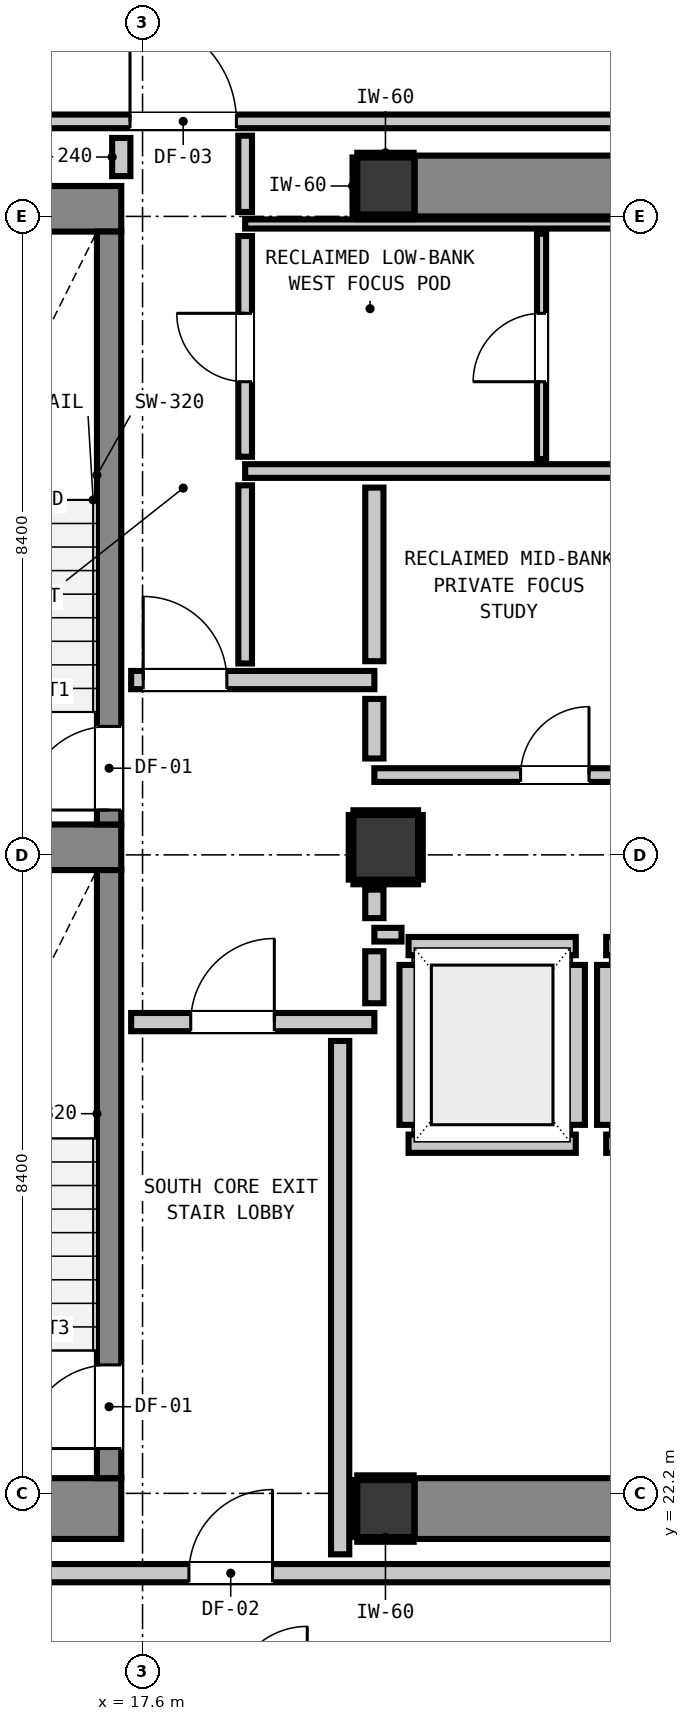
"""IFC4 building model, lengths in metres.
Left out: names, types, materials, properties, quantities, classifications, styles, units other than length and angle.
Written with IfcOpenShell. Run it as: python <this file> out.ifc"""

import sys

from ifc_helpers import new_model, si_unit, direction, frame, frame_2d, origin, origin_2d, place, context, subcontext, project, spatial, rectangle, extrude, element, fill, save


model = new_model("IFC4")
c1 = context("Model", 3, precision=1e-05, world=origin(), true_north=direction((0.0, 1.0)))
c2 = subcontext(c1, "Body", "Model", "MODEL_VIEW")
j1 = project(units=[si_unit("LENGTHUNIT", "METRE"), si_unit("PLANEANGLEUNIT", "RADIAN")], contexts=[c1])
p1 = place(None, origin())
s1 = spatial("IfcSite", under=j1, at=p1, CompositionType="ELEMENT")
p2 = place(p1, origin())
s2 = spatial("IfcBuilding", under=s1, at=p2, CompositionType="ELEMENT")
p3 = place(p2, frame((0.0, 0.0, 241.24)))
s3 = spatial("IfcBuildingStorey", under=s2, at=p3, CompositionType="ELEMENT", Elevation=241.24)
for number, where, z_axis, x_axis in (
    (1, (20.8, 22.0, 0.0), (0.0, 0.0, 1.0), (1.0, 0.0, 0.0)),
    (2, (20.8, 39.4, 0.0), (0.0, 0.0, 1.0), (1.0, 0.0, 0.0)),
):
    element("IfcColumn", number, at=place(p3, frame(where, z_axis=z_axis, x_axis=x_axis)), inside=s3, PredefinedType="COLUMN", context=c2, shape_type="SweptSolid", body=[
        extrude(rectangle(XDim=0.75, YDim=0.75, at=origin_2d()), origin(), (0.0, 0.0, 1.0), 3.32),
    ])
p4 = place(p3, frame((13.24, 22.0, 0.0), z_axis=(0.0, 0.0, 1.0), x_axis=(1.0, 0.0, 0.0)))
e3 = element("IfcWall", 3, at=p4, inside=s3, PredefinedType="SHEAR", context=c2, shape_type="SweptSolid", body=[
    extrude(rectangle(XDim=4.08, YDim=0.8, at=frame_2d((2.04, 0.0))), origin(), (0.0, 0.0, 1.0), 3.32),
])
p5 = place(p3, frame((13.24, 39.1, 0.0), z_axis=(0.0, 0.0, 1.0), x_axis=(1.0, 0.0, 0.0)))
e4 = element("IfcWall", 4, at=p5, inside=s3, PredefinedType="SHEAR", context=c2, shape_type="SweptSolid", body=[
    extrude(rectangle(XDim=4.08, YDim=0.6, at=frame_2d((2.04, 0.0))), origin(), (0.0, 0.0, 1.0), 3.32),
])
p6 = place(p3, frame((13.78, 30.7, 0.0), z_axis=(0.0, 0.0, 1.0), x_axis=(1.0, 0.0, 0.0)))
e5 = element("IfcWall", 5, at=p6, inside=s3, PredefinedType="SHEAR", context=c2, shape_type="SweptSolid", body=[
    extrude(rectangle(XDim=3.54, YDim=0.6, at=frame_2d((1.77, 0.0))), origin(), (0.0, 0.0, 1.0), 3.32),
])
for number, where, z_axis, x_axis in (
    (6, (21.18, 22.0, 0.0), (0.0, 0.0, 1.0), (1.0, 0.0, 0.0)),
    (7, (21.18, 39.4, 0.0), (0.0, 0.0, 1.0), (1.0, 0.0, 0.0)),
):
    element("IfcWall", number, at=place(p3, frame(where, z_axis=z_axis, x_axis=x_axis)), inside=s3, PredefinedType="SHEAR", context=c2, shape_type="SweptSolid", body=[
        extrude(rectangle(XDim=7.64, YDim=0.8, at=frame_2d((3.82, 0.0))), origin(), (0.0, 0.0, 1.0), 3.32),
    ])
p7 = place(p3, frame((17.16, 31.0, 0.0), z_axis=(0.0, 0.0, 1.0), x_axis=(0.0, 1.0, 0.0)))
e8 = element("IfcWall", 8, at=p7, inside=s3, PredefinedType="SHEAR", context=c2, shape_type="SweptSolid", body=[
    extrude(rectangle(XDim=7.8, YDim=0.32, at=frame_2d((3.9, 0.0))), origin(), (0.0, 0.0, 1.0), 3.32),
])
p8 = place(p7, frame((0.19, 0.0, 0.0)))
e9 = element("IfcOpeningElement", 9, at=p8, cuts=e8, PredefinedType="OPENING", context=c2, shape_type="SweptSolid", body=[
    extrude(rectangle(XDim=1.1, YDim=2.15, at=frame_2d((0.55, 1.075))), frame((0.0, 0.17, 0.0), z_axis=(0.0, -1.0, 0.0), x_axis=(1.0, 0.0, 0.0)), (0.0, 0.0, 1.0), 0.34),
])
p9 = place(p3, frame((17.16, 22.4, 0.0), z_axis=(0.0, 0.0, 1.0), x_axis=(0.0, 1.0, 0.0)))
e10 = element("IfcWall", 10, at=p9, inside=s3, PredefinedType="SHEAR", context=c2, shape_type="SweptSolid", body=[
    extrude(rectangle(XDim=8.0, YDim=0.32, at=frame_2d((4.0, 0.0))), origin(), (0.0, 0.0, 1.0), 3.32),
])
p10 = place(p9, frame((0.39, 0.0, 0.0)))
e11 = element("IfcOpeningElement", 11, at=p10, cuts=e10, PredefinedType="OPENING", context=c2, shape_type="SweptSolid", body=[
    extrude(rectangle(XDim=1.1, YDim=2.15, at=frame_2d((0.55, 1.075))), frame((0.0, 0.17, 0.0), z_axis=(0.0, -1.0, 0.0), x_axis=(1.0, 0.0, 0.0)), (0.0, 0.0, 1.0), 0.34),
])
p11 = place(p3, frame((20.8, 30.7, 0.0), z_axis=(0.0, 0.0, 1.0), x_axis=(1.0, 0.0, 0.0)))
e12 = element("IfcColumn", 12, at=p11, inside=s3, PredefinedType="COLUMN", context=c2, shape_type="SweptSolid", body=[
    extrude(rectangle(XDim=0.85, YDim=0.85, at=origin_2d()), origin(), (0.0, 0.0, 1.0), 3.32),
])
for number, where, z_axis, x_axis in (
    (13, (21.1, 26.8, 0.0), (0.0, 0.0, 1.0), (1.0, 0.0, 0.0)),
    (14, (21.1, 29.4, 0.0), (0.0, 0.0, 1.0), (1.0, 0.0, 0.0)),
):
    element("IfcWall", number, at=place(p3, frame(where, z_axis=z_axis, x_axis=x_axis)), inside=s3, PredefinedType="PARTITIONING", context=c2, shape_type="SweptSolid", body=[
        extrude(rectangle(XDim=2.2, YDim=0.24, at=frame_2d((1.1, 0.0))), origin(), (0.0, 0.0, 1.0), 3.1),
    ])
p12 = place(p3, frame((21.1, 27.048, 0.0), z_axis=(0.0, 0.0, 1.0), x_axis=(0.0, 1.0, 0.0)))
e15 = element("IfcWall", 15, at=p12, inside=s3, PredefinedType="PARTITIONING", context=c2, shape_type="SweptSolid", body=[
    extrude(rectangle(XDim=2.104, YDim=0.24, at=frame_2d((1.052, 0.0))), origin(), (0.0, 0.0, 1.0), 2.335),
])
p13 = place(p3, frame((23.3, 27.048, 0.0), z_axis=(0.0, 0.0, 1.0), x_axis=(0.0, 1.0, 0.0)))
e16 = element("IfcWall", 16, at=p13, inside=s3, PredefinedType="PARTITIONING", context=c2, shape_type="SweptSolid", body=[
    extrude(rectangle(XDim=2.104, YDim=0.24, at=frame_2d((1.052, 0.0))), origin(), (0.0, 0.0, 1.0), 3.1),
])
for number, where, z_axis, x_axis in (
    (17, (23.7, 26.8, 0.0), (0.0, 0.0, 1.0), (1.0, 0.0, 0.0)),
    (18, (23.7, 29.4, 0.0), (0.0, 0.0, 1.0), (1.0, 0.0, 0.0)),
):
    element("IfcWall", number, at=place(p3, frame(where, z_axis=z_axis, x_axis=x_axis)), inside=s3, PredefinedType="PARTITIONING", context=c2, shape_type="SweptSolid", body=[
        extrude(rectangle(XDim=2.2, YDim=0.24, at=frame_2d((1.1, 0.0))), origin(), (0.0, 0.0, 1.0), 3.1),
    ])
p14 = place(p3, frame((23.7, 27.048, 0.0), z_axis=(0.0, 0.0, 1.0), x_axis=(0.0, 1.0, 0.0)))
e19 = element("IfcWall", 19, at=p14, inside=s3, PredefinedType="PARTITIONING", context=c2, shape_type="SweptSolid", body=[
    extrude(rectangle(XDim=2.104, YDim=0.24, at=frame_2d((1.052, 0.0))), origin(), (0.0, 0.0, 1.0), 3.1),
])
p15 = place(p3, frame((10.787, 21.15, 0.0), z_axis=(0.0, 0.0, 1.0), x_axis=(1.0, 0.0, 0.0)))
e20 = element("IfcWall", 20, at=p15, inside=s3, PredefinedType="PARTITIONING", context=c2, shape_type="SweptSolid", body=[
    extrude(rectangle(XDim=26.102, YDim=0.24, at=frame_2d((13.051, 0.0))), origin(), (0.0, 0.0, 1.0), 3.1),
])
p16 = place(p15, frame((7.423, 0.0, 0.0)))
e21 = element("IfcOpeningElement", 21, at=p16, cuts=e20, PredefinedType="OPENING", context=c2, shape_type="SweptSolid", body=[
    extrude(rectangle(XDim=1.1, YDim=2.15, at=frame_2d((0.55, 1.075))), frame((0.0, 0.13, 0.0), z_axis=(0.0, -1.0, 0.0), x_axis=(1.0, 0.0, 0.0)), (0.0, 0.0, 1.0), 0.26),
])
p17 = place(p3, frame((17.45, 28.4, 0.0), z_axis=(0.0, 0.0, 1.0), x_axis=(1.0, 0.0, 0.0)))
e22 = element("IfcWall", 22, at=p17, inside=s3, PredefinedType="PARTITIONING", context=c2, shape_type="SweptSolid", body=[
    extrude(rectangle(XDim=3.2, YDim=0.24, at=frame_2d((1.6, 0.0))), origin(), (0.0, 0.0, 1.0), 3.1),
])
p18 = place(p17, frame((0.784, 0.0, 0.0)))
e23 = element("IfcOpeningElement", 23, at=p18, cuts=e22, PredefinedType="OPENING", context=c2, shape_type="SweptSolid", body=[
    extrude(rectangle(XDim=1.1, YDim=2.15, at=frame_2d((0.55, 1.075))), frame((0.0, 0.13, 0.0), z_axis=(0.0, -1.0, 0.0), x_axis=(1.0, 0.0, 0.0)), (0.0, 0.0, 1.0), 0.26),
])
p19 = place(p3, frame((17.45, 32.9, 0.0), z_axis=(0.0, 0.0, 1.0), x_axis=(1.0, 0.0, 0.0)))
e24 = element("IfcWall", 24, at=p19, inside=s3, PredefinedType="PARTITIONING", context=c2, shape_type="SweptSolid", body=[
    extrude(rectangle(XDim=3.2, YDim=0.24, at=frame_2d((1.6, 0.0))), origin(), (0.0, 0.0, 1.0), 3.1),
])
p20 = place(p19, frame((0.159, 0.0, 0.0)))
e25 = element("IfcOpeningElement", 25, at=p20, cuts=e24, PredefinedType="OPENING", context=c2, shape_type="SweptSolid", body=[
    extrude(rectangle(XDim=1.1, YDim=2.15, at=frame_2d((0.55, 1.075))), frame((0.0, 0.13, 0.0), z_axis=(0.0, -1.0, 0.0), x_axis=(1.0, 0.0, 0.0)), (0.0, 0.0, 1.0), 0.26),
])
p21 = place(p3, frame((20.65, 29.55, 0.0), z_axis=(0.0, 0.0, 1.0), x_axis=(1.0, 0.0, 0.0)))
e26 = element("IfcWall", 26, at=p21, inside=s3, PredefinedType="PARTITIONING", context=c2, shape_type="SweptSolid", body=[
    extrude(rectangle(XDim=0.357, YDim=0.18, at=frame_2d((0.179, 0.0))), origin(), (0.0, 0.0, 1.0), 3.1),
])
p22 = place(p3, frame((20.65, 31.65, 0.0), z_axis=(0.0, 0.0, 1.0), x_axis=(1.0, 0.0, 0.0)))
e27 = element("IfcWall", 27, at=p22, inside=s3, PredefinedType="PARTITIONING", context=c2, shape_type="SweptSolid", body=[
    extrude(rectangle(XDim=7.7, YDim=0.18, at=frame_2d((3.85, 0.0))), origin(), (0.0, 0.0, 1.0), 3.1),
])
p23 = place(p22, frame((1.924, 0.0, 0.0)))
e28 = element("IfcOpeningElement", 28, at=p23, cuts=e27, PredefinedType="OPENING", context=c2, shape_type="SweptSolid", body=[
    extrude(rectangle(XDim=0.9, YDim=2.1, at=frame_2d((0.45, 1.05))), frame((0.0, 0.1, 0.0), z_axis=(0.0, -1.0, 0.0), x_axis=(1.0, 0.0, 0.0)), (0.0, 0.0, 1.0), 0.2),
])
p24 = place(p3, frame((18.95, 35.65, 0.0), z_axis=(0.0, 0.0, 1.0), x_axis=(1.0, 0.0, 0.0)))
e29 = element("IfcWall", 29, at=p24, inside=s3, PredefinedType="PARTITIONING", context=c2, shape_type="SweptSolid", body=[
    extrude(rectangle(XDim=11.025, YDim=0.18, at=frame_2d((5.513, 0.0))), origin(), (0.0, 0.0, 1.0), 3.1),
])
p25 = place(p3, frame((10.787, 40.25, 0.0), z_axis=(0.0, 0.0, 1.0), x_axis=(1.0, 0.0, 0.0)))
e30 = element("IfcWall", 30, at=p25, inside=s3, PredefinedType="PARTITIONING", context=c2, shape_type="SweptSolid", body=[
    extrude(rectangle(XDim=36.626, YDim=0.18, at=frame_2d((18.313, 0.0))), origin(), (0.0, 0.0, 1.0), 3.1),
])
p26 = place(p25, frame((6.648, 0.0, 0.0)))
e31 = element("IfcOpeningElement", 31, at=p26, cuts=e30, PredefinedType="OPENING", context=c2, shape_type="SweptSolid", body=[
    extrude(rectangle(XDim=1.4, YDim=2.15, at=frame_2d((0.7, 1.075))), frame((0.0, 0.1, 0.0), z_axis=(0.0, -1.0, 0.0), x_axis=(1.0, 0.0, 0.0)), (0.0, 0.0, 1.0), 0.2),
])
p27 = place(p25, frame((31.482, 0.0, 0.0)))
e32 = element("IfcOpeningElement", 32, at=p27, cuts=e30, PredefinedType="OPENING", context=c2, shape_type="SweptSolid", body=[
    extrude(rectangle(XDim=1.0, YDim=2.15, at=frame_2d((0.5, 1.075))), frame((0.0, 0.1, 0.0), z_axis=(0.0, -1.0, 0.0), x_axis=(1.0, 0.0, 0.0)), (0.0, 0.0, 1.0), 0.2),
])
p28 = place(p3, frame((18.95, 38.9, 0.0), z_axis=(0.0, 0.0, 1.0), x_axis=(1.0, 0.0, 0.0)))
e33 = element("IfcWall", 33, at=p28, inside=s3, PredefinedType="PARTITIONING", context=c2, shape_type="SweptSolid", body=[
    extrude(rectangle(XDim=11.025, YDim=0.12, at=frame_2d((5.513, 0.0))), origin(), (0.0, 0.0, 1.0), 3.1),
])
p29 = place(p3, frame((17.32, 39.53, 0.0), z_axis=(0.0, 0.0, 1.0), x_axis=(0.0, 1.0, 0.0)))
e34 = element("IfcWall", 34, at=p29, inside=s3, PredefinedType="PARTITIONING", context=c2, shape_type="SweptSolid", body=[
    extrude(rectangle(XDim=0.502, YDim=0.24, at=frame_2d((0.251, 0.0))), origin(), (0.0, 0.0, 1.0), 3.1),
])
p30 = place(p3, frame((20.2, 21.398, 0.0), z_axis=(0.0, 0.0, 1.0), x_axis=(0.0, 1.0, 0.0)))
e35 = element("IfcWall", 35, at=p30, inside=s3, PredefinedType="PARTITIONING", context=c2, shape_type="SweptSolid", body=[
    extrude(rectangle(XDim=6.754, YDim=0.24, at=frame_2d((3.377, 0.0))), origin(), (0.0, 0.0, 1.0), 3.1),
])
p31 = place(p3, frame((20.65, 28.648, 0.0), z_axis=(0.0, 0.0, 1.0), x_axis=(0.0, 1.0, 0.0)))
e36 = element("IfcWall", 36, at=p31, inside=s3, PredefinedType="PARTITIONING", context=c2, shape_type="SweptSolid", body=[
    extrude(rectangle(XDim=0.684, YDim=0.24, at=frame_2d((0.342, 0.0))), origin(), (0.0, 0.0, 1.0), 2.335),
])
p32 = place(p3, frame((20.65, 29.768, 0.0), z_axis=(0.0, 0.0, 1.0), x_axis=(0.0, 1.0, 0.0)))
e37 = element("IfcWall", 37, at=p32, inside=s3, PredefinedType="PARTITIONING", context=c2, shape_type="SweptSolid", body=[
    extrude(rectangle(XDim=0.375, YDim=0.24, at=frame_2d((0.188, 0.0))), origin(), (0.0, 0.0, 1.0), 2.335),
])
p33 = place(p3, frame((20.65, 31.868, 0.0), z_axis=(0.0, 0.0, 1.0), x_axis=(0.0, 1.0, 0.0)))
e38 = element("IfcWall", 38, at=p33, inside=s3, PredefinedType="PARTITIONING", context=c2, shape_type="SweptSolid", body=[
    extrude(rectangle(XDim=0.784, YDim=0.24, at=frame_2d((0.392, 0.0))), origin(), (0.0, 0.0, 1.0), 2.335),
])
p34 = place(p3, frame((20.65, 33.148, 0.0), z_axis=(0.0, 0.0, 1.0), x_axis=(0.0, 1.0, 0.0)))
e39 = element("IfcWall", 39, at=p34, inside=s3, PredefinedType="PARTITIONING", context=c2, shape_type="SweptSolid", body=[
    extrude(rectangle(XDim=2.284, YDim=0.24, at=frame_2d((1.142, 0.0))), origin(), (0.0, 0.0, 1.0), 2.335),
])
p35 = place(p3, frame((18.95, 33.118, 0.0), z_axis=(0.0, 0.0, 1.0), x_axis=(0.0, 1.0, 0.0)))
e40 = element("IfcWall", 40, at=p35, inside=s3, PredefinedType="PARTITIONING", context=c2, shape_type="SweptSolid", body=[
    extrude(rectangle(XDim=2.344, YDim=0.18, at=frame_2d((1.172, 0.0))), origin(), (0.0, 0.0, 1.0), 3.1),
])
p36 = place(p3, frame((18.95, 35.838, 0.0), z_axis=(0.0, 0.0, 1.0), x_axis=(0.0, 1.0, 0.0)))
e41 = element("IfcWall", 41, at=p36, inside=s3, PredefinedType="PARTITIONING", context=c2, shape_type="SweptSolid", body=[
    extrude(rectangle(XDim=2.904, YDim=0.18, at=frame_2d((1.452, 0.0))), origin(), (0.0, 0.0, 1.0), 3.1),
])
p37 = place(p36, frame((0.987, 0.0, 0.0)))
e42 = element("IfcOpeningElement", 42, at=p37, cuts=e41, PredefinedType="OPENING", context=c2, shape_type="SweptSolid", body=[
    extrude(rectangle(XDim=0.9, YDim=2.1, at=frame_2d((0.45, 1.05))), frame((0.0, 0.1, 0.0), z_axis=(0.0, -1.0, 0.0), x_axis=(1.0, 0.0, 0.0)), (0.0, 0.0, 1.0), 0.2),
])
p38 = place(p3, frame((18.95, 39.058, 0.0), z_axis=(0.0, 0.0, 1.0), x_axis=(0.0, 1.0, 0.0)))
e43 = element("IfcWall", 43, at=p38, inside=s3, PredefinedType="PARTITIONING", context=c2, shape_type="SweptSolid", body=[
    extrude(rectangle(XDim=1.004, YDim=0.18, at=frame_2d((0.502, 0.0))), origin(), (0.0, 0.0, 1.0), 3.1),
])
p39 = place(p3, frame((22.85, 35.808, 0.0), z_axis=(0.0, 0.0, 1.0), x_axis=(0.0, 1.0, 0.0)))
e44 = element("IfcWall", 44, at=p39, inside=s3, PredefinedType="PARTITIONING", context=c2, shape_type="SweptSolid", body=[
    extrude(rectangle(XDim=2.964, YDim=0.12, at=frame_2d((1.482, 0.0))), origin(), (0.0, 0.0, 1.0), 3.1),
])
p40 = place(p39, frame((1.017, 0.0, 0.0)))
e45 = element("IfcOpeningElement", 45, at=p40, cuts=e44, PredefinedType="OPENING", context=c2, shape_type="SweptSolid", body=[
    extrude(rectangle(XDim=0.9, YDim=2.1, at=frame_2d((0.45, 1.05))), frame((0.0, 0.07, 0.0), z_axis=(0.0, -1.0, 0.0), x_axis=(1.0, 0.0, 0.0)), (0.0, 0.0, 1.0), 0.14),
])
for number, where, z_axis, x_axis in (
    (46, (20.425, 21.593, 0.0), (0.0, 0.0, 1.0), (1.0, 0.0, 0.0)),
    (47, (20.425, 22.407, 0.0), (0.0, 0.0, 1.0), (1.0, 0.0, 0.0)),
):
    element("IfcWall", number, at=place(p3, frame(where, z_axis=z_axis, x_axis=x_axis)), inside=s3, PredefinedType="PARTITIONING", context=c2, shape_type="SweptSolid", body=[
        extrude(rectangle(XDim=0.742, YDim=0.06, at=frame_2d((0.371, 0.0))), origin(), (0.0, 0.0, 1.0), 1.45),
    ])
p41 = place(p3, frame((20.393, 21.625, 0.0), z_axis=(0.0, 0.0, 1.0), x_axis=(0.0, 1.0, 0.0)))
e48 = element("IfcWall", 48, at=p41, inside=s3, PredefinedType="PARTITIONING", context=c2, shape_type="SweptSolid", body=[
    extrude(rectangle(XDim=0.75, YDim=0.06, at=frame_2d((0.375, 0.0))), origin(), (0.0, 0.0, 1.0), 1.45),
])
for number, where, z_axis, x_axis in (
    (49, (20.425, 38.993, 0.0), (0.0, 0.0, 1.0), (1.0, 0.0, 0.0)),
    (50, (20.425, 39.807, 0.0), (0.0, 0.0, 1.0), (1.0, 0.0, 0.0)),
):
    element("IfcWall", number, at=place(p3, frame(where, z_axis=z_axis, x_axis=x_axis)), inside=s3, PredefinedType="PARTITIONING", context=c2, shape_type="SweptSolid", body=[
        extrude(rectangle(XDim=0.742, YDim=0.06, at=frame_2d((0.371, 0.0))), origin(), (0.0, 0.0, 1.0), 1.45),
    ])
p42 = place(p3, frame((20.393, 39.025, 0.0), z_axis=(0.0, 0.0, 1.0), x_axis=(0.0, 1.0, 0.0)))
e51 = element("IfcWall", 51, at=p42, inside=s3, PredefinedType="PARTITIONING", context=c2, shape_type="SweptSolid", body=[
    extrude(rectangle(XDim=0.75, YDim=0.06, at=frame_2d((0.375, 0.0))), origin(), (0.0, 0.0, 1.0), 1.45),
])
for number, where, z_axis, x_axis in (
    (52, (20.375, 30.243, 0.0), (0.0, 0.0, 1.0), (1.0, 0.0, 0.0)),
    (53, (20.375, 31.157, 0.0), (0.0, 0.0, 1.0), (1.0, 0.0, 0.0)),
    (54, (20.343, 30.275, 0.0), (0.0, 0.0, 1.0), (0.0, 1.0, 0.0)),
    (55, (21.257, 30.275, 0.0), (0.0, 0.0, 1.0), (0.0, 1.0, 0.0)),
):
    element("IfcWall", number, at=place(p3, frame(where, z_axis=z_axis, x_axis=x_axis)), inside=s3, PredefinedType="PARTITIONING", context=c2, shape_type="SweptSolid", body=[
        extrude(rectangle(XDim=0.85, YDim=0.06, at=frame_2d((0.425, 0.0))), origin(), (0.0, 0.0, 1.0), 1.45),
    ])
p43 = place(p8, origin())
e56 = element("IfcDoor", 56, at=p43, inside=s3, OperationType="SINGLE_SWING_LEFT", PredefinedType="DOOR", context=c2, shape_type="SweptSolid", body=[
    extrude(rectangle(XDim=1.1, YDim=2.15, at=frame_2d((0.55, 1.075))), frame((0.0, 0.025, 0.0), z_axis=(0.0, -1.0, 0.0), x_axis=(1.0, 0.0, 0.0)), (0.0, 0.0, 1.0), 0.05),
])
fill(e9, e56)
p44 = place(p10, origin())
e57 = element("IfcDoor", 57, at=p44, inside=s3, OperationType="SINGLE_SWING_LEFT", PredefinedType="DOOR", context=c2, shape_type="SweptSolid", body=[
    extrude(rectangle(XDim=1.1, YDim=2.15, at=frame_2d((0.55, 1.075))), frame((0.0, 0.025, 0.0), z_axis=(0.0, -1.0, 0.0), x_axis=(1.0, 0.0, 0.0)), (0.0, 0.0, 1.0), 0.05),
])
fill(e11, e57)
p45 = place(p18, origin())
e58 = element("IfcDoor", 58, at=p45, inside=s3, OperationType="SINGLE_SWING_RIGHT", PredefinedType="DOOR", context=c2, shape_type="SweptSolid", body=[
    extrude(rectangle(XDim=1.1, YDim=2.15, at=frame_2d((0.55, 1.075))), frame((0.0, 0.025, 0.0), z_axis=(0.0, -1.0, 0.0), x_axis=(1.0, 0.0, 0.0)), (0.0, 0.0, 1.0), 0.05),
])
fill(e23, e58)
p46 = place(p20, origin())
e59 = element("IfcDoor", 59, at=p46, inside=s3, OperationType="SINGLE_SWING_LEFT", PredefinedType="DOOR", context=c2, shape_type="SweptSolid", body=[
    extrude(rectangle(XDim=1.1, YDim=2.15, at=frame_2d((0.55, 1.075))), frame((0.0, 0.025, 0.0), z_axis=(0.0, -1.0, 0.0), x_axis=(1.0, 0.0, 0.0)), (0.0, 0.0, 1.0), 0.05),
])
fill(e25, e59)
p47 = place(p16, origin())
e60 = element("IfcDoor", 60, at=p47, inside=s3, OperationType="SINGLE_SWING_RIGHT", PredefinedType="DOOR", context=c2, shape_type="SweptSolid", body=[
    extrude(rectangle(XDim=1.1, YDim=2.15, at=frame_2d((0.55, 1.075))), frame((0.0, 0.025, 0.0), z_axis=(0.0, -1.0, 0.0), x_axis=(1.0, 0.0, 0.0)), (0.0, 0.0, 1.0), 0.05),
])
fill(e21, e60)
p48 = place(p26, origin())
e61 = element("IfcDoor", 61, at=p48, inside=s3, OperationType="SINGLE_SWING_LEFT", PredefinedType="DOOR", context=c2, shape_type="SweptSolid", body=[
    extrude(rectangle(XDim=1.4, YDim=2.15, at=frame_2d((0.7, 1.075))), frame((0.0, 0.025, 0.0), z_axis=(0.0, -1.0, 0.0), x_axis=(1.0, 0.0, 0.0)), (0.0, 0.0, 1.0), 0.05),
])
fill(e31, e61)
p49 = place(p37, origin())
e62 = element("IfcDoor", 62, at=p49, inside=s3, OperationType="SINGLE_SWING_RIGHT", PredefinedType="DOOR", context=c2, shape_type="SweptSolid", body=[
    extrude(rectangle(XDim=0.9, YDim=2.1, at=frame_2d((0.45, 1.05))), frame((0.0, 0.025, 0.0), z_axis=(0.0, -1.0, 0.0), x_axis=(1.0, 0.0, 0.0)), (0.0, 0.0, 1.0), 0.05),
])
fill(e42, e62)
p50 = place(p40, origin())
e63 = element("IfcDoor", 63, at=p50, inside=s3, OperationType="SINGLE_SWING_LEFT", PredefinedType="DOOR", context=c2, shape_type="SweptSolid", body=[
    extrude(rectangle(XDim=0.9, YDim=2.1, at=frame_2d((0.45, 1.05))), frame((0.0, 0.025, 0.0), z_axis=(0.0, -1.0, 0.0), x_axis=(1.0, 0.0, 0.0)), (0.0, 0.0, 1.0), 0.05),
])
fill(e45, e63)
p51 = place(p23, origin())
e64 = element("IfcDoor", 64, at=p51, inside=s3, OperationType="SINGLE_SWING_RIGHT", PredefinedType="DOOR", context=c2, shape_type="SweptSolid", body=[
    extrude(rectangle(XDim=0.9, YDim=2.1, at=frame_2d((0.45, 1.05))), frame((0.0, 0.025, 0.0), z_axis=(0.0, -1.0, 0.0), x_axis=(1.0, 0.0, 0.0)), (0.0, 0.0, 1.0), 0.05),
])
fill(e28, e64)
save(model, sys.argv[1])
